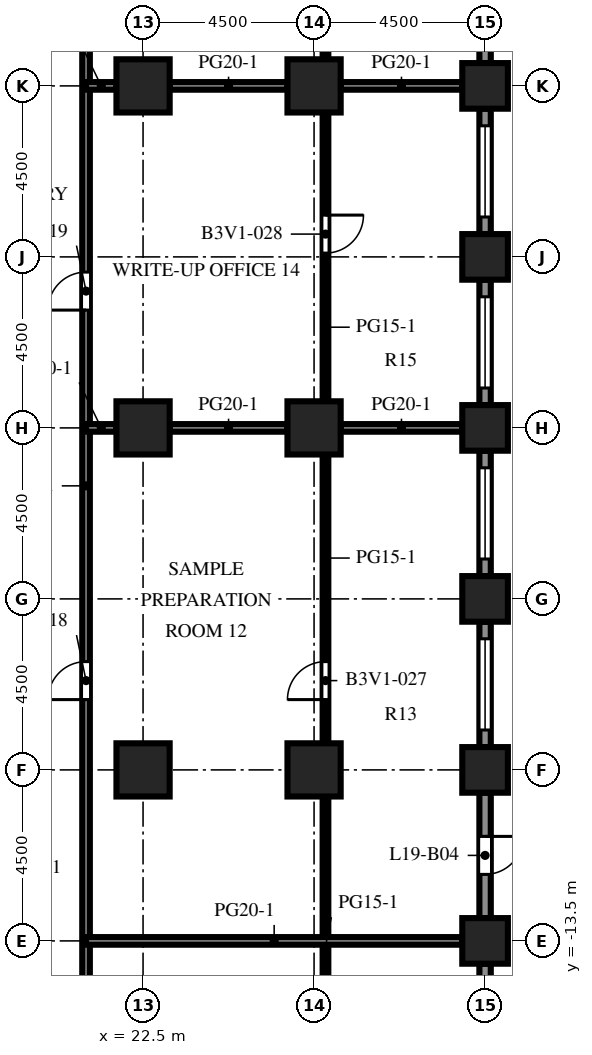
"""IFC4 building model, lengths in metres.
Left out: names, types, materials, properties, quantities, classifications, styles, units other than length and angle.
Written with IfcOpenShell. Run it as: python <this file> out.ifc"""

import sys

from ifc_helpers import new_model, si_unit, direction, frame, frame_2d, origin, origin_2d, place, context, subcontext, project, spatial, rectangle, extrude, element, fill, save


model = new_model("IFC4")
c1 = context("Model", 3, precision=1e-05, world=origin(), true_north=direction((0.0, 1.0)))
c2 = subcontext(c1, "Body", "Model", "MODEL_VIEW")
j1 = project(units=[si_unit("LENGTHUNIT", "METRE"), si_unit("PLANEANGLEUNIT", "RADIAN")], contexts=[c1])
p1 = place(None, origin())
s1 = spatial("IfcSite", under=j1, at=p1, CompositionType="ELEMENT")
p2 = place(p1, origin())
s2 = spatial("IfcBuilding", under=s1, at=p2, CompositionType="ELEMENT")
p3 = place(p2, frame((0.0, 0.0, 86.1)))
s3 = spatial("IfcBuildingStorey", under=s2, at=p3, CompositionType="ELEMENT", Elevation=86.1)
for number, where, z_axis, x_axis in (
    (1, (31.5, -13.5, 0.0), (0.0, 0.0, 1.0), (1.0, 0.0, 0.0)),
    (2, (31.5, -9.0, 0.0), (0.0, 0.0, 1.0), (1.0, 0.0, 0.0)),
    (3, (31.5, -4.5, 0.0), (0.0, 0.0, 1.0), (1.0, 0.0, 0.0)),
    (4, (31.5, 0.0, 0.0), (0.0, 0.0, 1.0), (1.0, 0.0, 0.0)),
    (5, (31.5, 4.5, 0.0), (0.0, 0.0, 1.0), (1.0, 0.0, 0.0)),
    (6, (31.5, 9.0, 0.0), (0.0, 0.0, 1.0), (1.0, 0.0, 0.0)),
):
    element("IfcColumn", number, at=place(p3, frame(where, z_axis=z_axis, x_axis=x_axis)), inside=s3, PredefinedType="COLUMN", context=c2, shape_type="SweptSolid", body=[
        extrude(rectangle(XDim=1.2, YDim=1.2, at=origin_2d()), origin(), (0.0, 0.0, 1.0), 4.1),
    ])
for number, where, z_axis, x_axis in (
    (7, (22.5, -9.0, 0.0), (0.0, 0.0, 1.0), (1.0, 0.0, 0.0)),
    (8, (22.5, 0.0, 0.0), (0.0, 0.0, 1.0), (1.0, 0.0, 0.0)),
    (9, (22.5, 9.0, 0.0), (0.0, 0.0, 1.0), (1.0, 0.0, 0.0)),
    (10, (27.0, -9.0, 0.0), (0.0, 0.0, 1.0), (1.0, 0.0, 0.0)),
    (11, (27.0, 0.0, 0.0), (0.0, 0.0, 1.0), (1.0, 0.0, 0.0)),
    (12, (27.0, 9.0, 0.0), (0.0, 0.0, 1.0), (1.0, 0.0, 0.0)),
):
    element("IfcColumn", number, at=place(p3, frame(where, z_axis=z_axis, x_axis=x_axis)), inside=s3, PredefinedType="COLUMN", context=c2, shape_type="SweptSolid", body=[
        extrude(rectangle(XDim=1.4, YDim=1.4, at=origin_2d()), origin(), (0.0, 0.0, 1.0), 4.1),
    ])
p4 = place(p3, frame((31.5, -14.1, 0.0), z_axis=(0.0, 0.0, 1.0), x_axis=(0.0, -1.0, 0.0)))
e13 = element("IfcWall", 13, at=p4, inside=s3, PredefinedType="SOLIDWALL", context=c2, shape_type="SweptSolid", body=[
    extrude(rectangle(XDim=3.3, YDim=0.3, at=frame_2d((1.65, 0.0))), origin(), (0.0, 0.0, 1.0), 2.75),
])
p5 = place(p4, frame((0.45, 0.0, 0.8)))
e14 = element("IfcOpeningElement", 14, at=p5, cuts=e13, PredefinedType="OPENING", context=c2, shape_type="SweptSolid", body=[
    extrude(rectangle(XDim=2.4, YDim=1.7, at=frame_2d((1.2, 0.85))), frame((0.0, 0.16, 0.0), z_axis=(0.0, -1.0, 0.0), x_axis=(1.0, 0.0, 0.0)), (0.0, 0.0, 1.0), 0.32),
])
p6 = place(p3, frame((31.5, -9.6, 0.0), z_axis=(0.0, 0.0, 1.0), x_axis=(0.0, -1.0, 0.0)))
e15 = element("IfcWall", 15, at=p6, inside=s3, PredefinedType="SOLIDWALL", context=c2, shape_type="SweptSolid", body=[
    extrude(rectangle(XDim=3.3, YDim=0.3, at=frame_2d((1.65, 0.0))), origin(), (0.0, 0.0, 1.0), 2.75),
])
p7 = place(p6, frame((1.15, 0.0, 0.0)))
e16 = element("IfcOpeningElement", 16, at=p7, cuts=e15, PredefinedType="OPENING", context=c2, shape_type="SweptSolid", body=[
    extrude(rectangle(XDim=1.0, YDim=2.2, at=frame_2d((0.5, 1.1))), frame((0.0, 0.16, 0.0), z_axis=(0.0, -1.0, 0.0), x_axis=(1.0, 0.0, 0.0)), (0.0, 0.0, 1.0), 0.32),
])
p8 = place(p3, frame((31.5, -5.1, 0.0), z_axis=(0.0, 0.0, 1.0), x_axis=(0.0, -1.0, 0.0)))
e17 = element("IfcWall", 17, at=p8, inside=s3, PredefinedType="SOLIDWALL", context=c2, shape_type="SweptSolid", body=[
    extrude(rectangle(XDim=3.3, YDim=0.3, at=frame_2d((1.65, 0.0))), origin(), (0.0, 0.0, 1.0), 2.75),
])
p9 = place(p8, frame((0.45, 0.0, 0.8)))
e18 = element("IfcOpeningElement", 18, at=p9, cuts=e17, PredefinedType="OPENING", context=c2, shape_type="SweptSolid", body=[
    extrude(rectangle(XDim=2.4, YDim=1.7, at=frame_2d((1.2, 0.85))), frame((0.0, 0.16, 0.0), z_axis=(0.0, -1.0, 0.0), x_axis=(1.0, 0.0, 0.0)), (0.0, 0.0, 1.0), 0.32),
])
p10 = place(p3, frame((31.5, -0.6, 0.0), z_axis=(0.0, 0.0, 1.0), x_axis=(0.0, -1.0, 0.0)))
e19 = element("IfcWall", 19, at=p10, inside=s3, PredefinedType="SOLIDWALL", context=c2, shape_type="SweptSolid", body=[
    extrude(rectangle(XDim=3.3, YDim=0.3, at=frame_2d((1.65, 0.0))), origin(), (0.0, 0.0, 1.0), 2.75),
])
p11 = place(p10, frame((0.45, 0.0, 0.8)))
e20 = element("IfcOpeningElement", 20, at=p11, cuts=e19, PredefinedType="OPENING", context=c2, shape_type="SweptSolid", body=[
    extrude(rectangle(XDim=2.4, YDim=1.7, at=frame_2d((1.2, 0.85))), frame((0.0, 0.16, 0.0), z_axis=(0.0, -1.0, 0.0), x_axis=(1.0, 0.0, 0.0)), (0.0, 0.0, 1.0), 0.32),
])
p12 = place(p3, frame((31.5, 3.9, 0.0), z_axis=(0.0, 0.0, 1.0), x_axis=(0.0, -1.0, 0.0)))
e21 = element("IfcWall", 21, at=p12, inside=s3, PredefinedType="SOLIDWALL", context=c2, shape_type="SweptSolid", body=[
    extrude(rectangle(XDim=3.3, YDim=0.3, at=frame_2d((1.65, 0.0))), origin(), (0.0, 0.0, 1.0), 2.75),
])
p13 = place(p12, frame((0.45, 0.0, 0.8)))
e22 = element("IfcOpeningElement", 22, at=p13, cuts=e21, PredefinedType="OPENING", context=c2, shape_type="SweptSolid", body=[
    extrude(rectangle(XDim=2.4, YDim=1.7, at=frame_2d((1.2, 0.85))), frame((0.0, 0.16, 0.0), z_axis=(0.0, -1.0, 0.0), x_axis=(1.0, 0.0, 0.0)), (0.0, 0.0, 1.0), 0.32),
])
p14 = place(p3, frame((31.5, 8.4, 0.0), z_axis=(0.0, 0.0, 1.0), x_axis=(0.0, -1.0, 0.0)))
e23 = element("IfcWall", 23, at=p14, inside=s3, PredefinedType="SOLIDWALL", context=c2, shape_type="SweptSolid", body=[
    extrude(rectangle(XDim=3.3, YDim=0.3, at=frame_2d((1.65, 0.0))), origin(), (0.0, 0.0, 1.0), 2.75),
])
p15 = place(p14, frame((0.45, 0.0, 0.8)))
e24 = element("IfcOpeningElement", 24, at=p15, cuts=e23, PredefinedType="OPENING", context=c2, shape_type="SweptSolid", body=[
    extrude(rectangle(XDim=2.4, YDim=1.7, at=frame_2d((1.2, 0.85))), frame((0.0, 0.16, 0.0), z_axis=(0.0, -1.0, 0.0), x_axis=(1.0, 0.0, 0.0)), (0.0, 0.0, 1.0), 0.32),
])
p16 = place(p3, frame((31.5, 12.9, 0.0), z_axis=(0.0, 0.0, 1.0), x_axis=(0.0, -1.0, 0.0)))
e25 = element("IfcWall", 25, at=p16, inside=s3, PredefinedType="SOLIDWALL", context=c2, shape_type="SweptSolid", body=[
    extrude(rectangle(XDim=3.3, YDim=0.3, at=frame_2d((1.65, 0.0))), origin(), (0.0, 0.0, 1.0), 2.75),
])
p17 = place(p16, frame((0.45, 0.0, 0.8)))
e26 = element("IfcOpeningElement", 26, at=p17, cuts=e25, PredefinedType="OPENING", context=c2, shape_type="SweptSolid", body=[
    extrude(rectangle(XDim=2.4, YDim=1.7, at=frame_2d((1.2, 0.85))), frame((0.0, 0.16, 0.0), z_axis=(0.0, -1.0, 0.0), x_axis=(1.0, 0.0, 0.0)), (0.0, 0.0, 1.0), 0.32),
])
p18 = place(p3, frame((21.0, 31.35, 0.0), z_axis=(0.0, 0.0, 1.0), x_axis=(0.0, -1.0, 0.0)))
e27 = element("IfcWall", 27, at=p18, inside=s3, PredefinedType="PARTITIONING", context=c2, shape_type="SweptSolid", body=[
    extrude(rectangle(XDim=53.7, YDim=0.2, at=frame_2d((26.85, 0.0))), origin(), (0.0, 0.0, 1.0), 3.65),
])
p19 = place(p18, frame((47.5, 0.0, 0.0)))
e28 = element("IfcOpeningElement", 28, at=p19, cuts=e27, PredefinedType="OPENING", context=c2, shape_type="SweptSolid", body=[
    extrude(rectangle(XDim=1.0, YDim=2.1, at=frame_2d((0.5, 1.05))), frame((0.0, 0.11, 0.0), z_axis=(0.0, -1.0, 0.0), x_axis=(1.0, 0.0, 0.0)), (0.0, 0.0, 1.0), 0.22),
])
p20 = place(p18, frame((37.5, 0.0, 0.0)))
e29 = element("IfcOpeningElement", 29, at=p20, cuts=e27, PredefinedType="OPENING", context=c2, shape_type="SweptSolid", body=[
    extrude(rectangle(XDim=1.0, YDim=2.1, at=frame_2d((0.5, 1.05))), frame((0.0, 0.11, 0.0), z_axis=(0.0, -1.0, 0.0), x_axis=(1.0, 0.0, 0.0)), (0.0, 0.0, 1.0), 0.22),
])
p21 = place(p18, frame((27.25, 0.0, 0.0)))
e30 = element("IfcOpeningElement", 30, at=p21, cuts=e27, PredefinedType="OPENING", context=c2, shape_type="SweptSolid", body=[
    extrude(rectangle(XDim=1.0, YDim=2.1, at=frame_2d((0.5, 1.05))), frame((0.0, 0.11, 0.0), z_axis=(0.0, -1.0, 0.0), x_axis=(1.0, 0.0, 0.0)), (0.0, 0.0, 1.0), 0.22),
])
p22 = place(p18, frame((17.5, 0.0, 0.0)))
e31 = element("IfcOpeningElement", 31, at=p22, cuts=e27, PredefinedType="OPENING", context=c2, shape_type="SweptSolid", body=[
    extrude(rectangle(XDim=1.0, YDim=2.1, at=frame_2d((0.5, 1.05))), frame((0.0, 0.11, 0.0), z_axis=(0.0, -1.0, 0.0), x_axis=(1.0, 0.0, 0.0)), (0.0, 0.0, 1.0), 0.22),
])
p23 = place(p18, frame((10.75, 0.0, 0.0)))
e32 = element("IfcOpeningElement", 32, at=p23, cuts=e27, PredefinedType="OPENING", context=c2, shape_type="SweptSolid", body=[
    extrude(rectangle(XDim=1.0, YDim=2.1, at=frame_2d((0.5, 1.05))), frame((0.0, 0.11, 0.0), z_axis=(0.0, -1.0, 0.0), x_axis=(1.0, 0.0, 0.0)), (0.0, 0.0, 1.0), 0.22),
])
p24 = place(p18, frame((5.25, 0.0, 0.0)))
e33 = element("IfcOpeningElement", 33, at=p24, cuts=e27, PredefinedType="OPENING", context=c2, shape_type="SweptSolid", body=[
    extrude(rectangle(XDim=1.0, YDim=2.1, at=frame_2d((0.5, 1.05))), frame((0.0, 0.11, 0.0), z_axis=(0.0, -1.0, 0.0), x_axis=(1.0, 0.0, 0.0)), (0.0, 0.0, 1.0), 0.22),
])
p25 = place(p3, frame((27.3, -9.7, 0.0), z_axis=(0.0, 0.0, 1.0), x_axis=(0.0, -1.0, 0.0)))
e34 = element("IfcWall", 34, at=p25, inside=s3, PredefinedType="PARTITIONING", context=c2, shape_type="SweptSolid", body=[
    extrude(rectangle(XDim=12.077, YDim=0.15, at=frame_2d((6.039, 0.0))), origin(), (0.0, 0.0, 1.0), 3.65),
])
p26 = place(p25, frame((7.9, 0.0, 0.0)))
e35 = element("IfcOpeningElement", 35, at=p26, cuts=e34, PredefinedType="OPENING", context=c2, shape_type="SweptSolid", body=[
    extrude(rectangle(XDim=1.0, YDim=2.1, at=frame_2d((0.5, 1.05))), frame((0.0, 0.085, 0.0), z_axis=(0.0, -1.0, 0.0), x_axis=(1.0, 0.0, 0.0)), (0.0, 0.0, 1.0), 0.17),
])
p27 = place(p3, frame((27.3, -0.7, 0.0), z_axis=(0.0, 0.0, 1.0), x_axis=(0.0, -1.0, 0.0)))
e36 = element("IfcWall", 36, at=p27, inside=s3, PredefinedType="PARTITIONING", context=c2, shape_type="SweptSolid", body=[
    extrude(rectangle(XDim=7.6, YDim=0.15, at=frame_2d((3.8, 0.0))), origin(), (0.0, 0.0, 1.0), 3.65),
])
p28 = place(p27, frame((5.45, 0.0, 0.0)))
e37 = element("IfcOpeningElement", 37, at=p28, cuts=e36, PredefinedType="OPENING", context=c2, shape_type="SweptSolid", body=[
    extrude(rectangle(XDim=1.0, YDim=2.1, at=frame_2d((0.5, 1.05))), frame((0.0, 0.085, 0.0), z_axis=(0.0, -1.0, 0.0), x_axis=(1.0, 0.0, 0.0)), (0.0, 0.0, 1.0), 0.17),
])
p29 = place(p3, frame((27.3, 8.3, 0.0), z_axis=(0.0, 0.0, 1.0), x_axis=(0.0, -1.0, 0.0)))
e38 = element("IfcWall", 38, at=p29, inside=s3, PredefinedType="PARTITIONING", context=c2, shape_type="SweptSolid", body=[
    extrude(rectangle(XDim=7.6, YDim=0.15, at=frame_2d((3.8, 0.0))), origin(), (0.0, 0.0, 1.0), 3.65),
])
p30 = place(p29, frame((2.7, 0.0, 0.0)))
e39 = element("IfcOpeningElement", 39, at=p30, cuts=e38, PredefinedType="OPENING", context=c2, shape_type="SweptSolid", body=[
    extrude(rectangle(XDim=1.0, YDim=2.1, at=frame_2d((0.5, 1.05))), frame((0.0, 0.085, 0.0), z_axis=(0.0, -1.0, 0.0), x_axis=(1.0, 0.0, 0.0)), (0.0, 0.0, 1.0), 0.17),
])
p31 = place(p3, frame((27.3, 17.3, 0.0), z_axis=(0.0, 0.0, 1.0), x_axis=(0.0, -1.0, 0.0)))
e40 = element("IfcWall", 40, at=p31, inside=s3, PredefinedType="PARTITIONING", context=c2, shape_type="SweptSolid", body=[
    extrude(rectangle(XDim=7.6, YDim=0.15, at=frame_2d((3.8, 0.0))), origin(), (0.0, 0.0, 1.0), 3.65),
])
p32 = place(p31, frame((2.7, 0.0, 0.0)))
e41 = element("IfcOpeningElement", 41, at=p32, cuts=e40, PredefinedType="OPENING", context=c2, shape_type="SweptSolid", body=[
    extrude(rectangle(XDim=1.0, YDim=2.1, at=frame_2d((0.5, 1.05))), frame((0.0, 0.085, 0.0), z_axis=(0.0, -1.0, 0.0), x_axis=(1.0, 0.0, 0.0)), (0.0, 0.0, 1.0), 0.17),
])
p33 = place(p3, frame((21.0, -13.5, 0.0), z_axis=(0.0, 0.0, 1.0), x_axis=(1.0, 0.0, 0.0)))
e42 = element("IfcWall", 42, at=p33, inside=s3, PredefinedType="PARTITIONING", context=c2, shape_type="SweptSolid", body=[
    extrude(rectangle(XDim=9.9, YDim=0.2, at=frame_2d((4.95, 0.0))), origin(), (0.0, 0.0, 1.0), 3.65),
])
p34 = place(p3, frame((21.0, 0.0, 0.0), z_axis=(0.0, 0.0, 1.0), x_axis=(1.0, 0.0, 0.0)))
e43 = element("IfcWall", 43, at=p34, inside=s3, PredefinedType="PARTITIONING", context=c2, shape_type="SweptSolid", body=[
    extrude(rectangle(XDim=0.8, YDim=0.2, at=frame_2d((0.4, 0.0))), origin(), (0.0, 0.0, 1.0), 3.65),
])
p35 = place(p3, frame((23.2, 0.0, 0.0), z_axis=(0.0, 0.0, 1.0), x_axis=(1.0, 0.0, 0.0)))
e44 = element("IfcWall", 44, at=p35, inside=s3, PredefinedType="PARTITIONING", context=c2, shape_type="SweptSolid", body=[
    extrude(rectangle(XDim=3.1, YDim=0.2, at=frame_2d((1.55, 0.0))), origin(), (0.0, 0.0, 1.0), 3.65),
])
p36 = place(p3, frame((27.7, 0.0, 0.0), z_axis=(0.0, 0.0, 1.0), x_axis=(1.0, 0.0, 0.0)))
e45 = element("IfcWall", 45, at=p36, inside=s3, PredefinedType="PARTITIONING", context=c2, shape_type="SweptSolid", body=[
    extrude(rectangle(XDim=3.2, YDim=0.2, at=frame_2d((1.6, 0.0))), origin(), (0.0, 0.0, 1.0), 3.65),
])
p37 = place(p3, frame((21.0, 9.0, 0.0), z_axis=(0.0, 0.0, 1.0), x_axis=(1.0, 0.0, 0.0)))
e46 = element("IfcWall", 46, at=p37, inside=s3, PredefinedType="PARTITIONING", context=c2, shape_type="SweptSolid", body=[
    extrude(rectangle(XDim=0.8, YDim=0.2, at=frame_2d((0.4, 0.0))), origin(), (0.0, 0.0, 1.0), 3.65),
])
p38 = place(p3, frame((23.2, 9.0, 0.0), z_axis=(0.0, 0.0, 1.0), x_axis=(1.0, 0.0, 0.0)))
e47 = element("IfcWall", 47, at=p38, inside=s3, PredefinedType="PARTITIONING", context=c2, shape_type="SweptSolid", body=[
    extrude(rectangle(XDim=3.1, YDim=0.2, at=frame_2d((1.55, 0.0))), origin(), (0.0, 0.0, 1.0), 3.65),
])
p39 = place(p3, frame((27.7, 9.0, 0.0), z_axis=(0.0, 0.0, 1.0), x_axis=(1.0, 0.0, 0.0)))
e48 = element("IfcWall", 48, at=p39, inside=s3, PredefinedType="PARTITIONING", context=c2, shape_type="SweptSolid", body=[
    extrude(rectangle(XDim=3.2, YDim=0.2, at=frame_2d((1.6, 0.0))), origin(), (0.0, 0.0, 1.0), 3.65),
])
p40 = place(p7, origin())
e49 = element("IfcDoor", 49, at=p40, inside=s3, OperationType="SINGLE_SWING_LEFT", PredefinedType="DOOR", context=c2, shape_type="SweptSolid", body=[
    extrude(rectangle(XDim=1.0, YDim=2.2, at=frame_2d((0.5, 1.1))), frame((0.0, 0.025, 0.0), z_axis=(0.0, -1.0, 0.0), x_axis=(1.0, 0.0, 0.0)), (0.0, 0.0, 1.0), 0.05),
])
fill(e16, e49)
p41 = place(p9, origin())
e50 = element("IfcWindow", 50, at=p41, inside=s3, PartitioningType="SINGLE_PANEL", PredefinedType="WINDOW", context=c2, shape_type="SweptSolid", body=[
    extrude(rectangle(XDim=2.4, YDim=1.7, at=frame_2d((1.2, 0.85))), frame((0.0, 0.03, 0.0), z_axis=(0.0, -1.0, 0.0), x_axis=(1.0, 0.0, 0.0)), (0.0, 0.0, 1.0), 0.06),
])
fill(e18, e50)
p42 = place(p11, origin())
e51 = element("IfcWindow", 51, at=p42, inside=s3, PartitioningType="SINGLE_PANEL", PredefinedType="WINDOW", context=c2, shape_type="SweptSolid", body=[
    extrude(rectangle(XDim=2.4, YDim=1.7, at=frame_2d((1.2, 0.85))), frame((0.0, 0.03, 0.0), z_axis=(0.0, -1.0, 0.0), x_axis=(1.0, 0.0, 0.0)), (0.0, 0.0, 1.0), 0.06),
])
fill(e20, e51)
p43 = place(p13, origin())
e52 = element("IfcWindow", 52, at=p43, inside=s3, PartitioningType="SINGLE_PANEL", PredefinedType="WINDOW", context=c2, shape_type="SweptSolid", body=[
    extrude(rectangle(XDim=2.4, YDim=1.7, at=frame_2d((1.2, 0.85))), frame((0.0, 0.03, 0.0), z_axis=(0.0, -1.0, 0.0), x_axis=(1.0, 0.0, 0.0)), (0.0, 0.0, 1.0), 0.06),
])
fill(e22, e52)
p44 = place(p15, origin())
e53 = element("IfcWindow", 53, at=p44, inside=s3, PartitioningType="SINGLE_PANEL", PredefinedType="WINDOW", context=c2, shape_type="SweptSolid", body=[
    extrude(rectangle(XDim=2.4, YDim=1.7, at=frame_2d((1.2, 0.85))), frame((0.0, 0.03, 0.0), z_axis=(0.0, -1.0, 0.0), x_axis=(1.0, 0.0, 0.0)), (0.0, 0.0, 1.0), 0.06),
])
fill(e24, e53)
p45 = place(p20, origin())
e54 = element("IfcDoor", 54, at=p45, inside=s3, OperationType="SINGLE_SWING_RIGHT", PredefinedType="DOOR", context=c2, shape_type="SweptSolid", body=[
    extrude(rectangle(XDim=1.0, YDim=2.1, at=frame_2d((0.5, 1.05))), frame((0.0, 0.025, 0.0), z_axis=(0.0, -1.0, 0.0), x_axis=(1.0, 0.0, 0.0)), (0.0, 0.0, 1.0), 0.05),
])
fill(e29, e54)
p46 = place(p21, origin())
e55 = element("IfcDoor", 55, at=p46, inside=s3, OperationType="SINGLE_SWING_RIGHT", PredefinedType="DOOR", context=c2, shape_type="SweptSolid", body=[
    extrude(rectangle(XDim=1.0, YDim=2.1, at=frame_2d((0.5, 1.05))), frame((0.0, 0.025, 0.0), z_axis=(0.0, -1.0, 0.0), x_axis=(1.0, 0.0, 0.0)), (0.0, 0.0, 1.0), 0.05),
])
fill(e30, e55)
p47 = place(p28, origin())
e56 = element("IfcDoor", 56, at=p47, inside=s3, OperationType="SINGLE_SWING_RIGHT", PredefinedType="DOOR", context=c2, shape_type="SweptSolid", body=[
    extrude(rectangle(XDim=1.0, YDim=2.1, at=frame_2d((0.5, 1.05))), frame((0.0, 0.025, 0.0), z_axis=(0.0, -1.0, 0.0), x_axis=(1.0, 0.0, 0.0)), (0.0, 0.0, 1.0), 0.05),
])
fill(e37, e56)
p48 = place(p30, origin())
e57 = element("IfcDoor", 57, at=p48, inside=s3, OperationType="SINGLE_SWING_LEFT", PredefinedType="DOOR", context=c2, shape_type="SweptSolid", body=[
    extrude(rectangle(XDim=1.0, YDim=2.1, at=frame_2d((0.5, 1.05))), frame((0.0, 0.025, 0.0), z_axis=(0.0, -1.0, 0.0), x_axis=(1.0, 0.0, 0.0)), (0.0, 0.0, 1.0), 0.05),
])
fill(e39, e57)
save(model, sys.argv[1])
